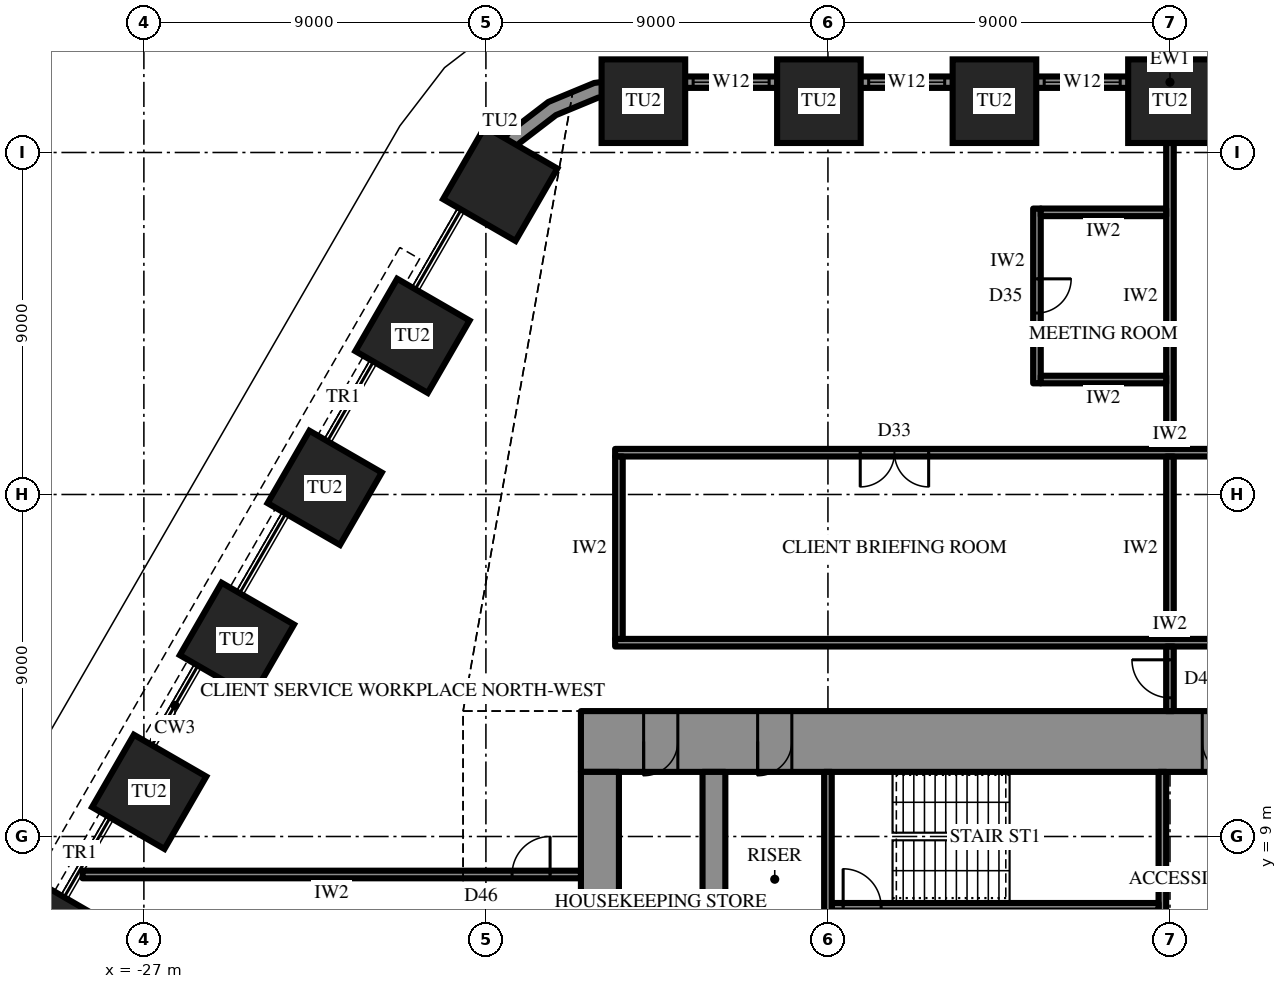
"""IFC4 building model, lengths in metres.
Left out: names, types, materials, properties, quantities, classifications, styles, units other than length and angle.
Written with IfcOpenShell. Run it as: python <this file> out.ifc"""

import sys

from ifc_helpers import new_model, si_unit, direction, frame, frame_2d, origin, origin_2d, place, context, subcontext, project, spatial, polyline, rectangle, hollow_rectangle, outline, extrude, element, fill, save


model = new_model("IFC4")
c1 = context("Model", 3, precision=1e-05, world=origin(), true_north=direction((0.0, 1.0)))
c2 = subcontext(c1, "Body", "Model", "MODEL_VIEW")
j1 = project(units=[si_unit("LENGTHUNIT", "METRE"), si_unit("PLANEANGLEUNIT", "RADIAN")], contexts=[c1])
p1 = place(None, origin())
s1 = spatial("IfcSite", under=j1, at=p1, CompositionType="ELEMENT")
p2 = place(p1, origin())
s2 = spatial("IfcBuilding", under=s1, at=p2, CompositionType="ELEMENT")
p3 = place(p2, frame((0.0, 0.0, 215.5)))
s3 = spatial("IfcBuildingStorey", under=s2, at=p3, CompositionType="ELEMENT", Elevation=215.5)
for number, where, z_axis, x_axis in (
    (1, (0.0, 28.35, 0.0), (0.0, 0.0, 1.0), (-1.0, 0.0, 0.0)),
    (2, (-4.619, 28.35, 0.0), (0.0, 0.0, 1.0), (-1.0, 0.0, 0.0)),
    (3, (-9.238, 28.35, 0.0), (0.0, 0.0, 1.0), (-1.0, 0.0, 0.0)),
    (4, (-13.856, 28.35, 0.0), (0.0, 0.0, 1.0), (-1.0, 0.0, 0.0)),
    (5, (-17.624, 26.175, 0.0), (0.0, 0.0, 1.0), (-0.5, -0.866, 0.0)),
    (6, (-19.933, 22.175, 0.0), (0.0, 0.0, 1.0), (-0.5, -0.866, 0.0)),
    (7, (-22.242, 18.175, 0.0), (0.0, 0.0, 1.0), (-0.5, -0.866, 0.0)),
    (8, (-24.552, 14.175, 0.0), (0.0, 0.0, 1.0), (-0.5, -0.866, 0.0)),
    (9, (-26.861, 10.175, 0.0), (0.0, 0.0, 1.0), (-0.5, -0.866, 0.0)),
    (10, (-29.171, 6.175, 0.0), (0.0, 0.0, 1.0), (-0.5, -0.866, 0.0)),
):
    element("IfcColumn", number, at=place(p3, frame(where, z_axis=z_axis, x_axis=x_axis)), inside=s3, PredefinedType="COLUMN", context=c2, shape_type="SweptSolid", body=[
        extrude(hollow_rectangle(XDim=2.2, YDim=2.2, WallThickness=0.12, at=origin_2d()), origin(), (0.0, 0.0, 1.0), 4.2),
    ])
p4 = place(p3, frame((-15.5, 11.5, 0.0), z_axis=(0.0, 0.0, 1.0), x_axis=(1.0, 0.0, 0.0)))
e11 = element("IfcWall", 11, at=p4, inside=s3, PredefinedType="SHEAR", context=c2, shape_type="SweptSolid", body=[
    extrude(rectangle(XDim=31.0, YDim=1.6, at=frame_2d((15.5, 0.0))), origin(), (0.0, 0.0, 1.0), 4.2),
])
p5 = place(p4, frame((16.35, 0.0, 0.0)))
e12 = element("IfcOpeningElement", 12, at=p5, cuts=e11, PredefinedType="OPENING", context=c2, shape_type="SweptSolid", body=[
    extrude(rectangle(XDim=0.9, YDim=2.2, at=frame_2d((0.45, 1.1))), frame((0.0, 0.81, 0.0), z_axis=(0.0, -1.0, 0.0), x_axis=(1.0, 0.0, 0.0)), (0.0, 0.0, 1.0), 1.62),
])
p6 = place(p4, frame((19.35, 0.0, 0.0)))
e13 = element("IfcOpeningElement", 13, at=p6, cuts=e11, PredefinedType="OPENING", context=c2, shape_type="SweptSolid", body=[
    extrude(rectangle(XDim=0.9, YDim=2.2, at=frame_2d((0.45, 1.1))), frame((0.0, 0.81, 0.0), z_axis=(0.0, -1.0, 0.0), x_axis=(1.0, 0.0, 0.0)), (0.0, 0.0, 1.0), 1.62),
])
p7 = place(p4, frame((22.4, 0.0, 0.0)))
e14 = element("IfcOpeningElement", 14, at=p7, cuts=e11, PredefinedType="OPENING", context=c2, shape_type="SweptSolid", body=[
    extrude(rectangle(XDim=1.0, YDim=2.2, at=frame_2d((0.5, 1.1))), frame((0.0, 0.81, 0.0), z_axis=(0.0, -1.0, 0.0), x_axis=(1.0, 0.0, 0.0)), (0.0, 0.0, 1.0), 1.62),
])
p8 = place(p4, frame((1.65, 0.0, 0.0)))
e15 = element("IfcOpeningElement", 15, at=p8, cuts=e11, PredefinedType="OPENING", context=c2, shape_type="SweptSolid", body=[
    extrude(rectangle(XDim=0.9, YDim=2.2, at=frame_2d((0.45, 1.1))), frame((0.0, 0.81, 0.0), z_axis=(0.0, -1.0, 0.0), x_axis=(1.0, 0.0, 0.0)), (0.0, 0.0, 1.0), 1.62),
])
p9 = place(p4, frame((4.65, 0.0, 0.0)))
e16 = element("IfcOpeningElement", 16, at=p9, cuts=e11, PredefinedType="OPENING", context=c2, shape_type="SweptSolid", body=[
    extrude(rectangle(XDim=0.9, YDim=2.2, at=frame_2d((0.45, 1.1))), frame((0.0, 0.81, 0.0), z_axis=(0.0, -1.0, 0.0), x_axis=(1.0, 0.0, 0.0)), (0.0, 0.0, 1.0), 1.62),
])
p10 = place(p4, frame((25.45, 0.0, 0.0)))
e17 = element("IfcOpeningElement", 17, at=p10, cuts=e11, PredefinedType="OPENING", context=c2, shape_type="SweptSolid", body=[
    extrude(rectangle(XDim=0.9, YDim=2.2, at=frame_2d((0.45, 1.1))), frame((0.0, 0.81, 0.0), z_axis=(0.0, -1.0, 0.0), x_axis=(1.0, 0.0, 0.0)), (0.0, 0.0, 1.0), 1.62),
])
p11 = place(p4, frame((28.45, 0.0, 0.0)))
e18 = element("IfcOpeningElement", 18, at=p11, cuts=e11, PredefinedType="OPENING", context=c2, shape_type="SweptSolid", body=[
    extrude(rectangle(XDim=0.9, YDim=2.2, at=frame_2d((0.45, 1.1))), frame((0.0, 0.81, 0.0), z_axis=(0.0, -1.0, 0.0), x_axis=(1.0, 0.0, 0.0)), (0.0, 0.0, 1.0), 1.62),
])
p12 = place(p3, frame((-15.0, 10.7, 0.0), z_axis=(0.0, 0.0, 1.0), x_axis=(0.0, -1.0, 0.0)))
e19 = element("IfcWall", 19, at=p12, inside=s3, PredefinedType="SHEAR", context=c2, shape_type="SweptSolid", body=[
    extrude(rectangle(XDim=21.4, YDim=1.0, at=frame_2d((10.7, 0.0))), origin(), (0.0, 0.0, 1.0), 4.2),
])
p13 = place(p12, frame((9.8, 0.0, 0.0)))
e20 = element("IfcOpeningElement", 20, at=p13, cuts=e19, PredefinedType="OPENING", context=c2, shape_type="SweptSolid", body=[
    extrude(rectangle(XDim=1.8, YDim=2.4, at=frame_2d((0.9, 1.2))), frame((0.0, 0.51, 0.0), z_axis=(0.0, -1.0, 0.0), x_axis=(1.0, 0.0, 0.0)), (0.0, 0.0, 1.0), 1.02),
])
p14 = place(p3, frame((-12.0, -10.7, 0.0), z_axis=(0.0, 0.0, 1.0), x_axis=(0.0, 1.0, 0.0)))
e21 = element("IfcWall", 21, at=p14, inside=s3, PredefinedType="SHEAR", context=c2, shape_type="SweptSolid", body=[
    extrude(rectangle(XDim=21.4, YDim=0.6, at=frame_2d((10.7, 0.0))), origin(), (0.0, 0.0, 1.0), 4.2),
])
p15 = place(p14, frame((9.8, 0.0, 0.0)))
e22 = element("IfcOpeningElement", 22, at=p15, cuts=e21, PredefinedType="OPENING", context=c2, shape_type="SweptSolid", body=[
    extrude(rectangle(XDim=1.8, YDim=2.4, at=frame_2d((0.9, 1.2))), frame((0.0, 0.31, 0.0), z_axis=(0.0, -1.0, 0.0), x_axis=(1.0, 0.0, 0.0)), (0.0, 0.0, 1.0), 0.62),
])
p16 = place(p3, frame((-0.2, 5.05, 0.0), z_axis=(0.0, 0.0, 1.0), x_axis=(0.0, 1.0, 0.0)))
e23 = element("IfcWall", 23, at=p16, inside=s3, PredefinedType="SHEAR", context=c2, shape_type="SweptSolid", body=[
    extrude(rectangle(XDim=5.65, YDim=0.2, at=frame_2d((2.825, 0.0))), origin(), (0.0, 0.0, 1.0), 4.2),
])
p17 = place(p3, frame((-8.9, 7.15, 0.0), z_axis=(0.0, 0.0, 1.0), x_axis=(1.0, 0.0, 0.0)))
e24 = element("IfcWall", 24, at=p17, inside=s3, PredefinedType="SHEAR", context=c2, shape_type="SweptSolid", body=[
    extrude(rectangle(XDim=8.6, YDim=0.2, at=frame_2d((4.3, 0.0))), origin(), (0.0, 0.0, 1.0), 4.2),
])
p18 = place(p17, frame((0.3, 0.0, 0.0)))
e25 = element("IfcOpeningElement", 25, at=p18, cuts=e24, PredefinedType="OPENING", context=c2, shape_type="SweptSolid", body=[
    extrude(rectangle(XDim=1.0, YDim=2.2, at=frame_2d((0.5, 1.1))), frame((0.0, 0.11, 0.0), z_axis=(0.0, -1.0, 0.0), x_axis=(1.0, 0.0, 0.0)), (0.0, 0.0, 1.0), 0.22),
])
p19 = place(p3, origin())
e26 = element("IfcWall", 26, at=p19, inside=s3, PredefinedType="SOLIDWALL", context=c2, shape_type="SweptSolid", body=[
    extrude(outline(polyline([(-13.856, 29.0), (-15.15, 28.83), (-16.356, 28.33), (-17.392, 27.536), (-18.187, 26.5), (-17.84, 26.3), (-17.109, 27.253), (-16.156, 27.984), (-15.047, 28.443), (-13.856, 28.6), (-13.856, 29.0)])), origin(), (0.0, 0.0, 1.0), 2.0),
])
p20 = place(p3, frame((13.856, 28.85, 0.0), z_axis=(0.0, 0.0, 1.0), x_axis=(-1.0, 0.0, 0.0)))
e27 = element("IfcWall", 27, at=p20, inside=s3, PredefinedType="SOLIDWALL", context=c2, shape_type="SweptSolid", body=[
    extrude(rectangle(XDim=27.713, YDim=0.3, at=frame_2d((13.856, 0.0))), origin(), (0.0, 0.0, 1.0), 2.0),
])
p21 = place(p20, frame((1.309, 0.0, 0.6)))
e28 = element("IfcOpeningElement", 28, at=p21, cuts=e27, PredefinedType="OPENING", context=c2, shape_type="SweptSolid", body=[
    extrude(rectangle(XDim=2.0, YDim=1.15, at=frame_2d((1.0, 0.575))), frame((0.0, 0.16, 0.0), z_axis=(0.0, -1.0, 0.0), x_axis=(1.0, 0.0, 0.0)), (0.0, 0.0, 1.0), 0.32),
])
p22 = place(p20, frame((5.928, 0.0, 0.6)))
e29 = element("IfcOpeningElement", 29, at=p22, cuts=e27, PredefinedType="OPENING", context=c2, shape_type="SweptSolid", body=[
    extrude(rectangle(XDim=2.0, YDim=1.15, at=frame_2d((1.0, 0.575))), frame((0.0, 0.16, 0.0), z_axis=(0.0, -1.0, 0.0), x_axis=(1.0, 0.0, 0.0)), (0.0, 0.0, 1.0), 0.32),
])
p23 = place(p20, frame((10.547, 0.0, 0.6)))
e30 = element("IfcOpeningElement", 30, at=p23, cuts=e27, PredefinedType="OPENING", context=c2, shape_type="SweptSolid", body=[
    extrude(rectangle(XDim=2.0, YDim=1.15, at=frame_2d((1.0, 0.575))), frame((0.0, 0.16, 0.0), z_axis=(0.0, -1.0, 0.0), x_axis=(1.0, 0.0, 0.0)), (0.0, 0.0, 1.0), 0.32),
])
p24 = place(p20, frame((15.166, 0.0, 0.6)))
e31 = element("IfcOpeningElement", 31, at=p24, cuts=e27, PredefinedType="OPENING", context=c2, shape_type="SweptSolid", body=[
    extrude(rectangle(XDim=2.0, YDim=1.15, at=frame_2d((1.0, 0.575))), frame((0.0, 0.16, 0.0), z_axis=(0.0, -1.0, 0.0), x_axis=(1.0, 0.0, 0.0)), (0.0, 0.0, 1.0), 0.32),
])
p25 = place(p20, frame((19.785, 0.0, 0.6)))
e32 = element("IfcOpeningElement", 32, at=p25, cuts=e27, PredefinedType="OPENING", context=c2, shape_type="SweptSolid", body=[
    extrude(rectangle(XDim=2.0, YDim=1.15, at=frame_2d((1.0, 0.575))), frame((0.0, 0.16, 0.0), z_axis=(0.0, -1.0, 0.0), x_axis=(1.0, 0.0, 0.0)), (0.0, 0.0, 1.0), 0.32),
])
p26 = place(p20, frame((24.403, 0.0, 0.6)))
e33 = element("IfcOpeningElement", 33, at=p26, cuts=e27, PredefinedType="OPENING", context=c2, shape_type="SweptSolid", body=[
    extrude(rectangle(XDim=2.0, YDim=1.15, at=frame_2d((1.0, 0.575))), frame((0.0, 0.16, 0.0), z_axis=(0.0, -1.0, 0.0), x_axis=(1.0, 0.0, 0.0)), (0.0, 0.0, 1.0), 0.32),
])
p27 = place(p3, frame((-9.0, 5.05, 0.0), z_axis=(0.0, 0.0, 1.0), x_axis=(0.0, 1.0, 0.0)))
e34 = element("IfcWall", 34, at=p27, inside=s3, PredefinedType="PARTITIONING", context=c2, shape_type="SweptSolid", body=[
    extrude(rectangle(XDim=5.65, YDim=0.2, at=frame_2d((2.825, 0.0))), origin(), (0.0, 0.0, 1.0), 4.0),
])
p28 = place(p3, frame((-14.6, 14.1, 0.0), z_axis=(0.0, 0.0, 1.0), x_axis=(1.0, 0.0, 0.0)))
e35 = element("IfcWall", 35, at=p28, inside=s3, PredefinedType="PARTITIONING", context=c2, shape_type="SweptSolid", body=[
    extrude(rectangle(XDim=29.2, YDim=0.2, at=frame_2d((14.6, 0.0))), origin(), (0.0, 0.0, 1.0), 4.0),
])
p29 = place(p3, frame((-14.6, 19.1, 0.0), z_axis=(0.0, 0.0, 1.0), x_axis=(1.0, 0.0, 0.0)))
e36 = element("IfcWall", 36, at=p29, inside=s3, PredefinedType="PARTITIONING", context=c2, shape_type="SweptSolid", body=[
    extrude(rectangle(XDim=29.2, YDim=0.2, at=frame_2d((14.6, 0.0))), origin(), (0.0, 0.0, 1.0), 4.0),
])
p30 = place(p29, frame((6.45, 0.0, 0.0)))
e37 = element("IfcOpeningElement", 37, at=p30, cuts=e36, PredefinedType="OPENING", context=c2, shape_type="SweptSolid", body=[
    extrude(rectangle(XDim=1.8, YDim=2.4, at=frame_2d((0.9, 1.2))), frame((0.0, 0.11, 0.0), z_axis=(0.0, -1.0, 0.0), x_axis=(1.0, 0.0, 0.0)), (0.0, 0.0, 1.0), 0.22),
])
p31 = place(p29, frame((20.95, 0.0, 0.0)))
e38 = element("IfcOpeningElement", 38, at=p31, cuts=e36, PredefinedType="OPENING", context=c2, shape_type="SweptSolid", body=[
    extrude(rectangle(XDim=1.8, YDim=2.4, at=frame_2d((0.9, 1.2))), frame((0.0, 0.11, 0.0), z_axis=(0.0, -1.0, 0.0), x_axis=(1.0, 0.0, 0.0)), (0.0, 0.0, 1.0), 0.22),
])
p32 = place(p3, frame((-14.5, 14.2, 0.0), z_axis=(0.0, 0.0, 1.0), x_axis=(0.0, 1.0, 0.0)))
e39 = element("IfcWall", 39, at=p32, inside=s3, PredefinedType="PARTITIONING", context=c2, shape_type="SweptSolid", body=[
    extrude(rectangle(XDim=4.8, YDim=0.2, at=frame_2d((2.4, 0.0))), origin(), (0.0, 0.0, 1.0), 4.0),
])
p33 = place(p3, frame((0.0, 14.2, 0.0), z_axis=(0.0, 0.0, 1.0), x_axis=(0.0, 1.0, 0.0)))
e40 = element("IfcWall", 40, at=p33, inside=s3, PredefinedType="PARTITIONING", context=c2, shape_type="SweptSolid", body=[
    extrude(rectangle(XDim=4.8, YDim=0.2, at=frame_2d((2.4, 0.0))), origin(), (0.0, 0.0, 1.0), 2.992),
])
p34 = place(p3, frame((0.0, 12.3, 0.0), z_axis=(0.0, 0.0, 1.0), x_axis=(0.0, 1.0, 0.0)))
e41 = element("IfcWall", 41, at=p34, inside=s3, PredefinedType="PARTITIONING", context=c2, shape_type="SweptSolid", body=[
    extrude(rectangle(XDim=1.7, YDim=0.2, at=frame_2d((0.85, 0.0))), origin(), (0.0, 0.0, 1.0), 2.992),
])
p35 = place(p34, frame((0.35, 0.0, 0.0)))
e42 = element("IfcOpeningElement", 42, at=p35, cuts=e41, PredefinedType="OPENING", context=c2, shape_type="SweptSolid", body=[
    extrude(rectangle(XDim=1.0, YDim=2.2, at=frame_2d((0.5, 1.1))), frame((0.0, 0.11, 0.0), z_axis=(0.0, -1.0, 0.0), x_axis=(1.0, 0.0, 0.0)), (0.0, 0.0, 1.0), 0.22),
])
p36 = place(p3, frame((0.0, 19.2, 0.0), z_axis=(0.0, 0.0, 1.0), x_axis=(0.0, 1.0, 0.0)))
e43 = element("IfcWall", 43, at=p36, inside=s3, PredefinedType="PARTITIONING", context=c2, shape_type="SweptSolid", body=[
    extrude(rectangle(XDim=8.05, YDim=0.2, at=frame_2d((4.025, 0.0))), origin(), (0.0, 0.0, 1.0), 2.992),
])
p37 = place(p3, frame((-15.5, 8.0, 0.0), z_axis=(0.0, 0.0, 1.0), x_axis=(-1.0, 0.0, 0.0)))
e44 = element("IfcWall", 44, at=p37, inside=s3, PredefinedType="PARTITIONING", context=c2, shape_type="SweptSolid", body=[
    extrude(rectangle(XDim=13.113, YDim=0.2, at=frame_2d((6.557, 0.0))), origin(), (0.0, 0.0, 1.0), 4.0),
])
p38 = place(p37, frame((0.811, 0.0, 0.0)))
e45 = element("IfcOpeningElement", 45, at=p38, cuts=e44, PredefinedType="OPENING", context=c2, shape_type="SweptSolid", body=[
    extrude(rectangle(XDim=1.0, YDim=2.2, at=frame_2d((0.5, 1.1))), frame((0.0, 0.11, 0.0), z_axis=(0.0, -1.0, 0.0), x_axis=(1.0, 0.0, 0.0)), (0.0, 0.0, 1.0), 0.22),
])
p39 = place(p3, frame((-3.5, 20.925, 0.0), z_axis=(0.0, 0.0, 1.0), x_axis=(0.0, 1.0, 0.0)))
e46 = element("IfcWall", 46, at=p39, inside=s3, PredefinedType="PARTITIONING", context=c2, shape_type="SweptSolid", body=[
    extrude(rectangle(XDim=4.6, YDim=0.2, at=frame_2d((2.3, 0.0))), origin(), (0.0, 0.0, 1.0), 4.0),
])
p40 = place(p39, frame((1.85, 0.0, 0.0)))
e47 = element("IfcOpeningElement", 47, at=p40, cuts=e46, PredefinedType="OPENING", context=c2, shape_type="SweptSolid", body=[
    extrude(rectangle(XDim=0.9, YDim=2.2, at=frame_2d((0.45, 1.1))), frame((0.0, 0.11, 0.0), z_axis=(0.0, -1.0, 0.0), x_axis=(1.0, 0.0, 0.0)), (0.0, 0.0, 1.0), 0.22),
])
for number, where, z_axis, x_axis in (
    (48, (-0.1, 21.025, 0.0), (0.0, 0.0, 1.0), (-1.0, 0.0, 0.0)),
    (49, (-0.1, 25.425, 0.0), (0.0, 0.0, 1.0), (-1.0, 0.0, 0.0)),
):
    element("IfcWall", number, at=place(p3, frame(where, z_axis=z_axis, x_axis=x_axis)), inside=s3, PredefinedType="PARTITIONING", context=c2, shape_type="SweptSolid", body=[
        extrude(rectangle(XDim=3.3, YDim=0.2, at=frame_2d((1.65, 0.0))), origin(), (0.0, 0.0, 1.0), 4.0),
    ])
p41 = place(p24, origin())
e50 = element("IfcWindow", 50, at=p41, inside=s3, PartitioningType="SINGLE_PANEL", PredefinedType="WINDOW", context=c2, shape_type="SweptSolid", body=[
    extrude(rectangle(XDim=2.0, YDim=1.15, at=frame_2d((1.0, 0.575))), frame((0.0, 0.03, 0.0), z_axis=(0.0, -1.0, 0.0), x_axis=(1.0, 0.0, 0.0)), (0.0, 0.0, 1.0), 0.06),
])
fill(e31, e50)
p42 = place(p25, origin())
e51 = element("IfcWindow", 51, at=p42, inside=s3, PartitioningType="SINGLE_PANEL", PredefinedType="WINDOW", context=c2, shape_type="SweptSolid", body=[
    extrude(rectangle(XDim=2.0, YDim=1.15, at=frame_2d((1.0, 0.575))), frame((0.0, 0.03, 0.0), z_axis=(0.0, -1.0, 0.0), x_axis=(1.0, 0.0, 0.0)), (0.0, 0.0, 1.0), 0.06),
])
fill(e32, e51)
p43 = place(p26, origin())
e52 = element("IfcWindow", 52, at=p43, inside=s3, PartitioningType="SINGLE_PANEL", PredefinedType="WINDOW", context=c2, shape_type="SweptSolid", body=[
    extrude(rectangle(XDim=2.0, YDim=1.15, at=frame_2d((1.0, 0.575))), frame((0.0, 0.03, 0.0), z_axis=(0.0, -1.0, 0.0), x_axis=(1.0, 0.0, 0.0)), (0.0, 0.0, 1.0), 0.06),
])
fill(e33, e52)
p44 = place(p18, origin())
e53 = element("IfcDoor", 53, at=p44, inside=s3, OperationType="SINGLE_SWING_RIGHT", PredefinedType="DOOR", context=c2, shape_type="SweptSolid", body=[
    extrude(rectangle(XDim=1.0, YDim=2.2, at=frame_2d((0.5, 1.1))), frame((0.0, 0.025, 0.0), z_axis=(0.0, -1.0, 0.0), x_axis=(1.0, 0.0, 0.0)), (0.0, 0.0, 1.0), 0.05),
])
fill(e25, e53)
p45 = place(p5, frame((0.9, 0.0, 0.0), z_axis=(0.0, 0.0, 1.0), x_axis=(-1.0, 0.0, 0.0)))
e54 = element("IfcDoor", 54, at=p45, inside=s3, OperationType="SINGLE_SWING_RIGHT", PredefinedType="DOOR", context=c2, shape_type="SweptSolid", body=[
    extrude(rectangle(XDim=0.9, YDim=2.2, at=frame_2d((0.45, 1.1))), frame((0.0, 0.025, 0.0), z_axis=(0.0, -1.0, 0.0), x_axis=(1.0, 0.0, 0.0)), (0.0, 0.0, 1.0), 0.05),
])
fill(e12, e54)
p46 = place(p8, frame((0.9, 0.0, 0.0), z_axis=(0.0, 0.0, 1.0), x_axis=(-1.0, 0.0, 0.0)))
e55 = element("IfcDoor", 55, at=p46, inside=s3, OperationType="SINGLE_SWING_LEFT", PredefinedType="DOOR", context=c2, shape_type="SweptSolid", body=[
    extrude(rectangle(XDim=0.9, YDim=2.2, at=frame_2d((0.45, 1.1))), frame((0.0, 0.025, 0.0), z_axis=(0.0, -1.0, 0.0), x_axis=(1.0, 0.0, 0.0)), (0.0, 0.0, 1.0), 0.05),
])
fill(e15, e55)
p47 = place(p9, frame((0.9, 0.0, 0.0), z_axis=(0.0, 0.0, 1.0), x_axis=(-1.0, 0.0, 0.0)))
e56 = element("IfcDoor", 56, at=p47, inside=s3, OperationType="SINGLE_SWING_LEFT", PredefinedType="DOOR", context=c2, shape_type="SweptSolid", body=[
    extrude(rectangle(XDim=0.9, YDim=2.2, at=frame_2d((0.45, 1.1))), frame((0.0, 0.025, 0.0), z_axis=(0.0, -1.0, 0.0), x_axis=(1.0, 0.0, 0.0)), (0.0, 0.0, 1.0), 0.05),
])
fill(e16, e56)
p48 = place(p30, frame((1.8, 0.0, 0.0), z_axis=(0.0, 0.0, 1.0), x_axis=(-1.0, 0.0, 0.0)))
e57 = element("IfcDoor", 57, at=p48, inside=s3, OperationType="DOUBLE_DOOR_SINGLE_SWING", PredefinedType="DOOR", context=c2, shape_type="SweptSolid", body=[
    extrude(rectangle(XDim=1.8, YDim=2.4, at=frame_2d((0.9, 1.2))), frame((0.0, 0.025, 0.0), z_axis=(0.0, -1.0, 0.0), x_axis=(1.0, 0.0, 0.0)), (0.0, 0.0, 1.0), 0.05),
])
fill(e37, e57)
p49 = place(p35, origin())
e58 = element("IfcDoor", 58, at=p49, inside=s3, OperationType="SINGLE_SWING_LEFT", PredefinedType="DOOR", context=c2, shape_type="SweptSolid", body=[
    extrude(rectangle(XDim=1.0, YDim=2.2, at=frame_2d((0.5, 1.1))), frame((0.0, 0.025, 0.0), z_axis=(0.0, -1.0, 0.0), x_axis=(1.0, 0.0, 0.0)), (0.0, 0.0, 1.0), 0.05),
])
fill(e42, e58)
p50 = place(p38, frame((1.0, 0.0, 0.0), z_axis=(0.0, 0.0, 1.0), x_axis=(-1.0, 0.0, 0.0)))
e59 = element("IfcDoor", 59, at=p50, inside=s3, OperationType="SINGLE_SWING_LEFT", PredefinedType="DOOR", context=c2, shape_type="SweptSolid", body=[
    extrude(rectangle(XDim=1.0, YDim=2.2, at=frame_2d((0.5, 1.1))), frame((0.0, 0.025, 0.0), z_axis=(0.0, -1.0, 0.0), x_axis=(1.0, 0.0, 0.0)), (0.0, 0.0, 1.0), 0.05),
])
fill(e45, e59)
p51 = place(p40, frame((0.9, 0.0, 0.0), z_axis=(0.0, 0.0, 1.0), x_axis=(-1.0, 0.0, 0.0)))
e60 = element("IfcDoor", 60, at=p51, inside=s3, OperationType="SINGLE_SWING_RIGHT", PredefinedType="DOOR", context=c2, shape_type="SweptSolid", body=[
    extrude(rectangle(XDim=0.9, YDim=2.2, at=frame_2d((0.45, 1.1))), frame((0.0, 0.025, 0.0), z_axis=(0.0, -1.0, 0.0), x_axis=(1.0, 0.0, 0.0)), (0.0, 0.0, 1.0), 0.05),
])
fill(e47, e60)
save(model, sys.argv[1])
